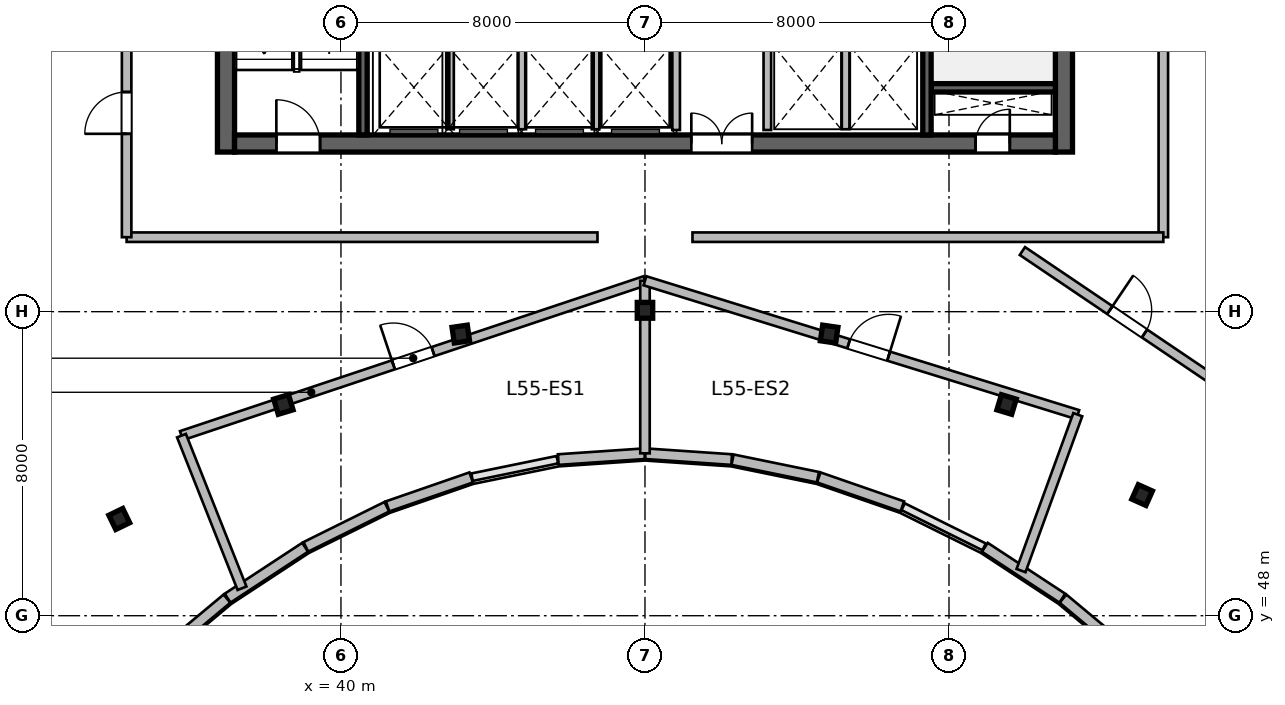
"""IFC4 building model, lengths in metres.
Left out: names, types, materials, properties, quantities, classifications, styles, units other than length and angle.
Written with IfcOpenShell. Run it as: python <this file> out.ifc"""

import sys

from ifc_helpers import new_model, si_unit, direction, frame, frame_2d, origin, origin_2d, place, context, subcontext, project, spatial, rectangle, i_section, extrude, source, transform, mapped, element, fill, save


model = new_model("IFC4")
c1 = context("Model", 3, precision=1e-05, world=origin(), true_north=direction((0.0, 1.0)))
c2 = subcontext(c1, "Body", "Model", "MODEL_VIEW")
j1 = project(units=[si_unit("LENGTHUNIT", "METRE"), si_unit("PLANEANGLEUNIT", "RADIAN")], contexts=[c1])
p1 = place(None, origin())
s1 = spatial("IfcSite", under=j1, at=p1, CompositionType="ELEMENT")
p2 = place(p1, origin())
s2 = spatial("IfcBuilding", under=s1, at=p2, CompositionType="ELEMENT")
p3 = place(p2, frame((0.0, 0.0, 227.4)))
s3 = spatial("IfcBuildingStorey", under=s2, at=p3, CompositionType="ELEMENT", Elevation=227.4)
m1 = source(origin(), c2, "Body", "SweptSolid", [
    extrude(rectangle(XDim=12.0, YDim=0.45, at=frame_2d((6.0, 0.0))), origin(), (0.0, 0.0, 1.0), 3.9),
])
for number, where, z_axis, x_axis in (
    (1, (36.975, 60.2, 0.0), (0.0, 0.0, 1.0), (0.0, 1.0, 0.0)),
    (2, (59.025, 60.2, 0.0), (0.0, 0.0, 1.0), (0.0, 1.0, 0.0)),
):
    element("IfcWall", number, at=place(p3, frame(where, z_axis=z_axis, x_axis=x_axis)), inside=s3, PredefinedType="SHEAR", context=c2, shape_type="MappedRepresentation", body=[
        mapped(m1, transform((0.0, 0.0, 0.0), scale=1.0)),
    ])
m2 = source(origin(), c2, "Body", "SweptSolid", [
    extrude(rectangle(XDim=21.6, YDim=0.45, at=frame_2d((10.8, 0.0))), origin(), (0.0, 0.0, 1.0), 3.9),
])
p4 = place(p3, frame((37.2, 60.425, 0.0), z_axis=(0.0, 0.0, 1.0), x_axis=(1.0, 0.0, 0.0)))
e3 = element("IfcWall", 3, at=p4, inside=s3, PredefinedType="SHEAR", context=c2, shape_type="MappedRepresentation", body=[
    mapped(m2, transform((0.0, 0.0, 0.0), scale=1.0)),
])
p5 = place(p4, frame((1.1, 0.0, 0.0)))
e4 = element("IfcOpeningElement", 4, at=p5, cuts=e3, PredefinedType="OPENING", context=c2, shape_type="SweptSolid", body=[
    extrude(rectangle(XDim=1.15, YDim=2.15, at=frame_2d((0.575, 1.075))), frame((0.0, 0.235, 0.0), z_axis=(0.0, -1.0, 0.0), x_axis=(1.0, 0.0, 0.0)), (0.0, 0.0, 1.0), 0.47),
])
p6 = place(p4, frame((19.5, 0.0, 0.0)))
e5 = element("IfcOpeningElement", 5, at=p6, cuts=e3, PredefinedType="OPENING", context=c2, shape_type="SweptSolid", body=[
    extrude(rectangle(XDim=0.9, YDim=2.1, at=frame_2d((0.45, 1.05))), frame((0.0, 0.235, 0.0), z_axis=(0.0, -1.0, 0.0), x_axis=(1.0, 0.0, 0.0)), (0.0, 0.0, 1.0), 0.47),
])
p7 = place(p4, frame((12.02, 0.0, 0.0)))
e6 = element("IfcOpeningElement", 6, at=p7, cuts=e3, PredefinedType="OPENING", context=c2, shape_type="SweptSolid", body=[
    extrude(rectangle(XDim=1.6, YDim=2.15, at=frame_2d((0.8, 1.075))), frame((0.0, 0.235, 0.0), z_axis=(0.0, -1.0, 0.0), x_axis=(1.0, 0.0, 0.0)), (0.0, 0.0, 1.0), 0.47),
])
m3 = source(origin(), c2, "Body", "SweptSolid", [
    extrude(rectangle(XDim=3.27, YDim=0.22, at=frame_2d((1.635, 0.0))), origin(), (0.0, 0.0, 1.0), 3.9),
])
p8 = place(p3, frame((55.53, 61.89, 0.0), z_axis=(0.0, 0.0, 1.0), x_axis=(1.0, 0.0, 0.0)))
e7 = element("IfcWall", 7, at=p8, inside=s3, PredefinedType="SHEAR", context=c2, shape_type="MappedRepresentation", body=[
    mapped(m3, transform((0.0, 0.0, 0.0), scale=1.0)),
])
m4 = source(origin(), c2, "Body", "SweptSolid", [
    extrude(rectangle(XDim=11.1, YDim=0.22, at=frame_2d((5.55, 0.0))), origin(), (0.0, 0.0, 1.0), 3.9),
])
p9 = place(p3, frame((40.58, 60.65, 0.0), z_axis=(0.0, 0.0, 1.0), x_axis=(0.0, 1.0, 0.0)))
e8 = element("IfcWall", 8, at=p9, inside=s3, PredefinedType="SHEAR", context=c2, shape_type="MappedRepresentation", body=[
    mapped(m4, transform((0.0, 0.0, 0.0), scale=1.0)),
])
p10 = place(p3, frame((55.42, 60.65, 0.0), z_axis=(0.0, 0.0, 1.0), x_axis=(0.0, 1.0, 0.0)))
e9 = element("IfcWall", 9, at=p10, inside=s3, PredefinedType="SHEAR", context=c2, shape_type="MappedRepresentation", body=[
    mapped(m4, transform((0.0, 0.0, 0.0), scale=1.0)),
])
p11 = place(p10, frame((9.595, 0.0, 0.0)))
e10 = element("IfcOpeningElement", 10, at=p11, cuts=e9, PredefinedType="OPENING", context=c2, shape_type="SweptSolid", body=[
    extrude(rectangle(XDim=1.15, YDim=2.15, at=frame_2d((0.575, 1.075))), frame((0.0, 0.12, 0.0), z_axis=(0.0, -1.0, 0.0), x_axis=(1.0, 0.0, 0.0)), (0.0, 0.0, 1.0), 0.24),
])
m5 = source(origin(), c2, "Body", "SweptSolid", [
    extrude(i_section(OverallWidth=0.406, OverallDepth=0.416, WebThickness=0.03, FlangeThickness=0.048, at=origin_2d()), origin(), (0.0, 0.0, 1.0), 3.9),
])
for number, where, z_axis, x_axis in (
    (11, (34.166, 50.545, 0.0), (0.0, 0.0, 1.0), (-0.436, 0.9, 0.0)),
    (12, (38.485, 53.558, 0.0), (0.0, 0.0, 1.0), (-0.289, 0.957, 0.0)),
    (13, (43.154, 55.411, 0.0), (0.0, 0.0, 1.0), (-0.143, 0.99, 0.0)),
    (14, (48.0, 56.036, 0.0), (0.0, 0.0, 1.0), (0.0, 1.0, 0.0)),
    (15, (52.846, 55.411, 0.0), (0.0, 0.0, 1.0), (0.143, 0.99, 0.0)),
    (16, (57.515, 53.558, 0.0), (0.0, 0.0, 1.0), (0.289, 0.957, 0.0)),
    (17, (61.082, 51.175, 0.0), (0.0, 0.0, 1.0), (0.409, 0.912, 0.0)),
):
    element("IfcColumn", number, at=place(p3, frame(where, z_axis=z_axis, x_axis=x_axis)), inside=s3, PredefinedType="COLUMN", context=c2, shape_type="MappedRepresentation", body=[
        mapped(m5, transform((0.0, 0.0, 0.0), scale=1.0)),
    ])
m6 = source(origin(), c2, "Body", "SweptSolid", [
    extrude(rectangle(XDim=2.511, YDim=0.28, at=frame_2d((1.256, 0.0))), origin(), (0.0, 0.0, 1.0), 3.65),
])
p12 = place(p3, frame((60.928, 46.841, 0.0), z_axis=(0.0, 0.0, 1.0), x_axis=(-0.767910416122, 0.640557251782, 0.0)))
e18 = element("IfcWall", 18, at=p12, inside=s3, PredefinedType="SOLIDWALL", context=c2, shape_type="MappedRepresentation", body=[
    mapped(m6, transform((0.0, 0.0, 0.0), scale=1.0)),
])
m7 = source(origin(), c2, "Body", "SweptSolid", [
    extrude(rectangle(XDim=2.44, YDim=0.28, at=frame_2d((1.22, 0.0))), origin(), (0.0, 0.0, 1.0), 3.65),
])
p13 = place(p3, frame((58.983, 48.462, 0.0), z_axis=(0.0, 0.0, 1.0), x_axis=(-0.83598480459, 0.548752591333, 0.0)))
e19 = element("IfcWall", 19, at=p13, inside=s3, PredefinedType="SOLIDWALL", context=c2, shape_type="MappedRepresentation", body=[
    mapped(m7, transform((0.0, 0.0, 0.0), scale=1.0)),
])
m8 = source(origin(), c2, "Body", "SweptSolid", [
    extrude(rectangle(XDim=2.328, YDim=0.28, at=frame_2d((1.164, 0.0))), origin(), (0.0, 0.0, 1.0), 3.65),
])
p14 = place(p3, frame((54.772, 50.876, 0.0), z_axis=(0.0, 0.0, 1.0), x_axis=(-0.944872545641, 0.32743834915, 0.0)))
e20 = element("IfcWall", 20, at=p14, inside=s3, PredefinedType="SOLIDWALL", context=c2, shape_type="MappedRepresentation", body=[
    mapped(m8, transform((0.0, 0.0, 0.0), scale=1.0)),
])
m9 = source(origin(), c2, "Body", "SweptSolid", [
    extrude(rectangle(XDim=2.292, YDim=0.28, at=frame_2d((1.146, 0.0))), origin(), (0.0, 0.0, 1.0), 3.65),
])
p15 = place(p3, frame((52.55, 51.645, 0.0), z_axis=(0.0, 0.0, 1.0), x_axis=(-0.979635482689, 0.200784264963, 0.0)))
e21 = element("IfcWall", 21, at=p15, inside=s3, PredefinedType="SOLIDWALL", context=c2, shape_type="MappedRepresentation", body=[
    mapped(m9, transform((0.0, 0.0, 0.0), scale=1.0)),
])
m10 = source(origin(), c2, "Body", "SweptSolid", [
    extrude(rectangle(XDim=2.274, YDim=0.28, at=frame_2d((1.137, 0.0))), origin(), (0.0, 0.0, 1.0), 3.65),
])
for number, where, z_axis, x_axis in (
    (22, (50.281, 52.109, 0.0), (0.0, 0.0, 1.0), (-0.998, 0.068, 0.0)),
    (23, (47.988, 52.263, 0.0), (0.0, 0.0, 1.0), (-0.998, -0.068, 0.0)),
):
    element("IfcWall", number, at=place(p3, frame(where, z_axis=z_axis, x_axis=x_axis)), inside=s3, PredefinedType="SOLIDWALL", context=c2, shape_type="MappedRepresentation", body=[
        mapped(m10, transform((0.0, 0.0, 0.0), scale=1.0)),
    ])
p16 = place(p3, frame((43.427, 51.639, 0.0), z_axis=(0.0, 0.0, 1.0), x_axis=(-0.944872545641, -0.32743834915, 0.0)))
e24 = element("IfcWall", 24, at=p16, inside=s3, PredefinedType="SOLIDWALL", context=c2, shape_type="MappedRepresentation", body=[
    mapped(m8, transform((0.0, 0.0, 0.0), scale=1.0)),
])
m11 = source(origin(), c2, "Body", "SweptSolid", [
    extrude(rectangle(XDim=2.378, YDim=0.28, at=frame_2d((1.189, 0.0))), origin(), (0.0, 0.0, 1.0), 3.65),
])
p17 = place(p3, frame((41.207, 50.868, 0.0), z_axis=(0.0, 0.0, 1.0), x_axis=(-0.895941616831, -0.444171835252, 0.0)))
e25 = element("IfcWall", 25, at=p17, inside=s3, PredefinedType="SOLIDWALL", context=c2, shape_type="MappedRepresentation", body=[
    mapped(m11, transform((0.0, 0.0, 0.0), scale=1.0)),
])
p18 = place(p3, frame((39.057, 49.801, 0.0), z_axis=(0.0, 0.0, 1.0), x_axis=(-0.83598480459, -0.548752591333, 0.0)))
e26 = element("IfcWall", 26, at=p18, inside=s3, PredefinedType="SOLIDWALL", context=c2, shape_type="MappedRepresentation", body=[
    mapped(m7, transform((0.0, 0.0, 0.0), scale=1.0)),
])
p19 = place(p3, frame((37.001, 48.449, 0.0), z_axis=(0.0, 0.0, 1.0), x_axis=(-0.767910416122, -0.640557251782, 0.0)))
e27 = element("IfcWall", 27, at=p19, inside=s3, PredefinedType="SOLIDWALL", context=c2, shape_type="MappedRepresentation", body=[
    mapped(m6, transform((0.0, 0.0, 0.0), scale=1.0)),
])
m12 = source(origin(), c2, "Body", "SweptSolid", [
    extrude(rectangle(XDim=2.24, YDim=0.2, at=frame_2d((1.12, 0.0))), origin(), (0.0, 0.0, 1.0), 3.65),
])
for number, where, z_axis, x_axis in (
    (28, (48.82, 60.78, 0.0), (0.0, 0.0, 1.0), (0.0, 1.0, 0.0)),
    (29, (51.22, 60.78, 0.0), (0.0, 0.0, 1.0), (0.0, 1.0, 0.0)),
):
    element("IfcWall", number, at=place(p3, frame(where, z_axis=z_axis, x_axis=x_axis)), inside=s3, PredefinedType="SOLIDWALL", context=c2, shape_type="MappedRepresentation", body=[
        mapped(m12, transform((0.0, 0.0, 0.0), scale=1.0)),
    ])
m13 = source(origin(), c2, "Body", "SweptSolid", [
    extrude(rectangle(XDim=2.2, YDim=0.2, at=frame_2d((1.1, 0.0))), origin(), (0.0, 0.0, 1.0), 3.65),
])
for number, where, z_axis, x_axis in (
    (30, (42.87, 60.8, 0.0), (0.0, 0.0, 1.0), (0.0, 1.0, 0.0)),
    (31, (44.77, 60.8, 0.0), (0.0, 0.0, 1.0), (0.0, 1.0, 0.0)),
    (32, (46.7, 60.8, 0.0), (0.0, 0.0, 1.0), (0.0, 1.0, 0.0)),
    (33, (53.28, 60.8, 0.0), (0.0, 0.0, 1.0), (0.0, 1.0, 0.0)),
):
    element("IfcWall", number, at=place(p3, frame(where, z_axis=z_axis, x_axis=x_axis)), inside=s3, PredefinedType="SOLIDWALL", context=c2, shape_type="MappedRepresentation", body=[
        mapped(m13, transform((0.0, 0.0, 0.0), scale=1.0)),
    ])
m14 = source(origin(), c2, "Body", "SweptSolid", [
    extrude(rectangle(XDim=12.86, YDim=0.25, at=frame_2d((6.43, 0.0))), origin(), (0.0, 0.0, 1.0), 3.095),
])
p20 = place(p3, frame((35.803, 52.738, 0.0), z_axis=(0.0, 0.0, 1.0), x_axis=(0.948466647997, 0.316876975554, 0.0)))
e34 = element("IfcWall", 34, at=p20, inside=s3, PredefinedType="PARTITIONING", context=c2, shape_type="MappedRepresentation", body=[
    mapped(m14, transform((0.0, 0.0, 0.0), scale=1.0)),
])
p21 = place(p20, frame((5.88, 0.0, 0.0)))
e35 = element("IfcOpeningElement", 35, at=p21, cuts=e34, PredefinedType="OPENING", context=c2, shape_type="SweptSolid", body=[
    extrude(rectangle(XDim=1.1, YDim=2.15, at=frame_2d((0.55, 1.075))), frame((0.0, 0.135, 0.0), z_axis=(0.0, -1.0, 0.0), x_axis=(1.0, 0.0, 0.0)), (0.0, 0.0, 1.0), 0.27),
])
m15 = source(origin(), c2, "Body", "SweptSolid", [
    extrude(rectangle(XDim=4.32, YDim=0.25, at=frame_2d((2.16, 0.0))), origin(), (0.0, 0.0, 1.0), 3.65),
])
p22 = place(p3, frame((37.396, 48.723, 0.0), z_axis=(0.0, 0.0, 1.0), x_axis=(-0.368846295269, 0.929490403644, 0.0)))
e36 = element("IfcWall", 36, at=p22, inside=s3, PredefinedType="PARTITIONING", context=c2, shape_type="MappedRepresentation", body=[
    mapped(m15, transform((0.0, 0.0, 0.0), scale=1.0)),
])
m16 = source(origin(), c2, "Body", "SweptSolid", [
    extrude(rectangle(XDim=4.541, YDim=0.25, at=frame_2d((2.27, 0.0))), origin(), (0.0, 0.0, 1.0), 3.095),
])
p23 = place(p3, frame((48.0, 52.273, 0.0), z_axis=(0.0, 0.0, 1.0), x_axis=(0.0, 1.0, 0.0)))
e37 = element("IfcWall", 37, at=p23, inside=s3, PredefinedType="PARTITIONING", context=c2, shape_type="MappedRepresentation", body=[
    mapped(m16, transform((0.0, 0.0, 0.0), scale=1.0)),
])
m17 = source(origin(), c2, "Body", "SweptSolid", [
    extrude(rectangle(XDim=11.921, YDim=0.25, at=frame_2d((5.961, 0.0))), origin(), (0.0, 0.0, 1.0), 3.095),
])
p24 = place(p3, frame((48.0, 56.813, 0.0), z_axis=(0.0, 0.0, 1.0), x_axis=(0.955326235971, -0.295553350287, 0.0)))
e38 = element("IfcWall", 38, at=p24, inside=s3, PredefinedType="PARTITIONING", context=c2, shape_type="MappedRepresentation", body=[
    mapped(m17, transform((0.0, 0.0, 0.0), scale=1.0)),
])
p25 = place(p24, frame((5.611, 0.0, 0.0)))
e39 = element("IfcOpeningElement", 39, at=p25, cuts=e38, PredefinedType="OPENING", context=c2, shape_type="SweptSolid", body=[
    extrude(rectangle(XDim=1.1, YDim=2.15, at=frame_2d((0.55, 1.075))), frame((0.0, 0.135, 0.0), z_axis=(0.0, -1.0, 0.0), x_axis=(1.0, 0.0, 0.0)), (0.0, 0.0, 1.0), 0.27),
])
m18 = source(origin(), c2, "Body", "SweptSolid", [
    extrude(rectangle(XDim=4.366, YDim=0.25, at=frame_2d((2.183, 0.0))), origin(), (0.0, 0.0, 1.0), 3.65),
])
p26 = place(p3, frame((57.896, 49.187, 0.0), z_axis=(0.0, 0.0, 1.0), x_axis=(0.342061827486, 0.939677447945, 0.0)))
e40 = element("IfcWall", 40, at=p26, inside=s3, PredefinedType="PARTITIONING", context=c2, shape_type="MappedRepresentation", body=[
    mapped(m18, transform((0.0, 0.0, 0.0), scale=1.0)),
])
m19 = source(origin(), c2, "Body", "SweptSolid", [
    extrude(rectangle(XDim=6.654, YDim=0.25, at=frame_2d((3.327, 0.0))), origin(), (0.0, 0.0, 1.0), 3.217),
])
p27 = place(p3, frame((57.932, 57.596, 0.0), z_axis=(0.0, 0.0, 1.0), x_axis=(0.828704875625, -0.559685830726, 0.0)))
e41 = element("IfcWall", 41, at=p27, inside=s3, PredefinedType="PARTITIONING", context=c2, shape_type="MappedRepresentation", body=[
    mapped(m19, transform((0.0, 0.0, 0.0), scale=1.0)),
])
p28 = place(p27, frame((2.777, 0.0, 0.0)))
e42 = element("IfcOpeningElement", 42, at=p28, cuts=e41, PredefinedType="OPENING", context=c2, shape_type="SweptSolid", body=[
    extrude(rectangle(XDim=1.1, YDim=2.15, at=frame_2d((0.55, 1.075))), frame((0.0, 0.135, 0.0), z_axis=(0.0, -1.0, 0.0), x_axis=(1.0, 0.0, 0.0)), (0.0, 0.0, 1.0), 0.27),
])
m20 = source(origin(), c2, "Body", "SweptSolid", [
    extrude(rectangle(XDim=19.209, YDim=0.25, at=frame_2d((9.604, 0.0))), origin(), (0.0, 0.0, 1.0), 3.65),
])
p29 = place(p3, frame((61.64, 57.96, 0.0), z_axis=(0.0, 0.0, 1.0), x_axis=(0.0, 1.0, 0.0)))
e43 = element("IfcWall", 43, at=p29, inside=s3, PredefinedType="PARTITIONING", context=c2, shape_type="MappedRepresentation", body=[
    mapped(m20, transform((0.0, 0.0, 0.0), scale=1.0)),
])
m21 = source(origin(), c2, "Body", "SweptSolid", [
    extrude(rectangle(XDim=12.39, YDim=0.25, at=frame_2d((6.195, 0.0))), origin(), (0.0, 0.0, 1.0), 3.217),
])
for number, where, z_axis, x_axis in (
    (44, (34.36, 57.96, 0.0), (0.0, 0.0, 1.0), (1.0, 0.0, 0.0)),
    (45, (49.25, 57.96, 0.0), (0.0, 0.0, 1.0), (1.0, 0.0, 0.0)),
):
    element("IfcWall", number, at=place(p3, frame(where, z_axis=z_axis, x_axis=x_axis)), inside=s3, PredefinedType="PARTITIONING", context=c2, shape_type="MappedRepresentation", body=[
        mapped(m21, transform((0.0, 0.0, 0.0), scale=1.0)),
    ])
m22 = source(origin(), c2, "Body", "SweptSolid", [
    extrude(rectangle(XDim=6.54, YDim=0.25, at=frame_2d((3.27, 0.0))), origin(), (0.0, 0.0, 1.0), 3.65),
])
p30 = place(p3, frame((34.36, 57.96, 0.0), z_axis=(0.0, 0.0, 1.0), x_axis=(0.0, 1.0, 0.0)))
e46 = element("IfcWall", 46, at=p30, inside=s3, PredefinedType="PARTITIONING", context=c2, shape_type="MappedRepresentation", body=[
    mapped(m22, transform((0.0, 0.0, 0.0), scale=1.0)),
])
p31 = place(p30, frame((2.72, 0.0, 0.0)))
e47 = element("IfcOpeningElement", 47, at=p31, cuts=e46, PredefinedType="OPENING", context=c2, shape_type="SweptSolid", body=[
    extrude(rectangle(XDim=1.1, YDim=2.15, at=frame_2d((0.55, 1.075))), frame((0.0, 0.135, 0.0), z_axis=(0.0, -1.0, 0.0), x_axis=(1.0, 0.0, 0.0)), (0.0, 0.0, 1.0), 0.27),
])
m23 = source(origin(), c2, "Body", "SweptSolid", [
    extrude(rectangle(XDim=1.15, YDim=2.15, at=frame_2d((0.575, 1.075))), frame((0.0, 0.025, 0.0), z_axis=(0.0, -1.0, 0.0), x_axis=(1.0, 0.0, 0.0)), (0.0, 0.0, 1.0), 0.05),
])
p32 = place(p5, origin())
e48 = element("IfcDoor", 48, at=p32, inside=s3, OperationType="SINGLE_SWING_LEFT", PredefinedType="DOOR", context=c2, shape_type="MappedRepresentation", body=[
    mapped(m23, transform((0.0, 0.0, 0.0), scale=1.0)),
])
fill(e4, e48)
m24 = source(origin(), c2, "Body", "SweptSolid", [
    extrude(rectangle(XDim=0.9, YDim=2.1, at=frame_2d((0.45, 1.05))), frame((0.0, 0.025, 0.0), z_axis=(0.0, -1.0, 0.0), x_axis=(1.0, 0.0, 0.0)), (0.0, 0.0, 1.0), 0.05),
])
p33 = place(p6, origin())
e49 = element("IfcDoor", 49, at=p33, inside=s3, OperationType="SINGLE_SWING_RIGHT", PredefinedType="DOOR", context=c2, shape_type="MappedRepresentation", body=[
    mapped(m24, transform((0.0, 0.0, 0.0), scale=1.0)),
])
fill(e5, e49)
m25 = source(origin(), c2, "Body", "SweptSolid", [
    extrude(rectangle(XDim=1.6, YDim=2.15, at=frame_2d((0.8, 1.075))), frame((0.0, 0.025, 0.0), z_axis=(0.0, -1.0, 0.0), x_axis=(1.0, 0.0, 0.0)), (0.0, 0.0, 1.0), 0.05),
])
p34 = place(p7, origin())
e50 = element("IfcDoor", 50, at=p34, inside=s3, OperationType="DOUBLE_DOOR_SINGLE_SWING", PredefinedType="DOOR", context=c2, shape_type="MappedRepresentation", body=[
    mapped(m25, transform((0.0, 0.0, 0.0), scale=1.0)),
])
fill(e6, e50)
m26 = source(origin(), c2, "Body", "SweptSolid", [
    extrude(rectangle(XDim=1.1, YDim=2.15, at=frame_2d((0.55, 1.075))), frame((0.0, 0.025, 0.0), z_axis=(0.0, -1.0, 0.0), x_axis=(1.0, 0.0, 0.0)), (0.0, 0.0, 1.0), 0.05),
])
p35 = place(p21, origin())
e51 = element("IfcDoor", 51, at=p35, inside=s3, OperationType="SINGLE_SWING_LEFT", PredefinedType="DOOR", context=c2, shape_type="MappedRepresentation", body=[
    mapped(m26, transform((0.0, 0.0, 0.0), scale=1.0)),
])
fill(e35, e51)
p36 = place(p25, origin())
e52 = element("IfcDoor", 52, at=p36, inside=s3, OperationType="SINGLE_SWING_RIGHT", PredefinedType="DOOR", context=c2, shape_type="MappedRepresentation", body=[
    mapped(m26, transform((0.0, 0.0, 0.0), scale=1.0)),
])
fill(e39, e52)
p37 = place(p28, origin())
e53 = element("IfcDoor", 53, at=p37, inside=s3, OperationType="SINGLE_SWING_LEFT", PredefinedType="DOOR", context=c2, shape_type="MappedRepresentation", body=[
    mapped(m26, transform((0.0, 0.0, 0.0), scale=1.0)),
])
fill(e42, e53)
p38 = place(p31, origin())
e54 = element("IfcDoor", 54, at=p38, inside=s3, OperationType="SINGLE_SWING_LEFT", PredefinedType="DOOR", context=c2, shape_type="MappedRepresentation", body=[
    mapped(m26, transform((0.0, 0.0, 0.0), scale=1.0)),
])
fill(e47, e54)
save(model, sys.argv[1])
